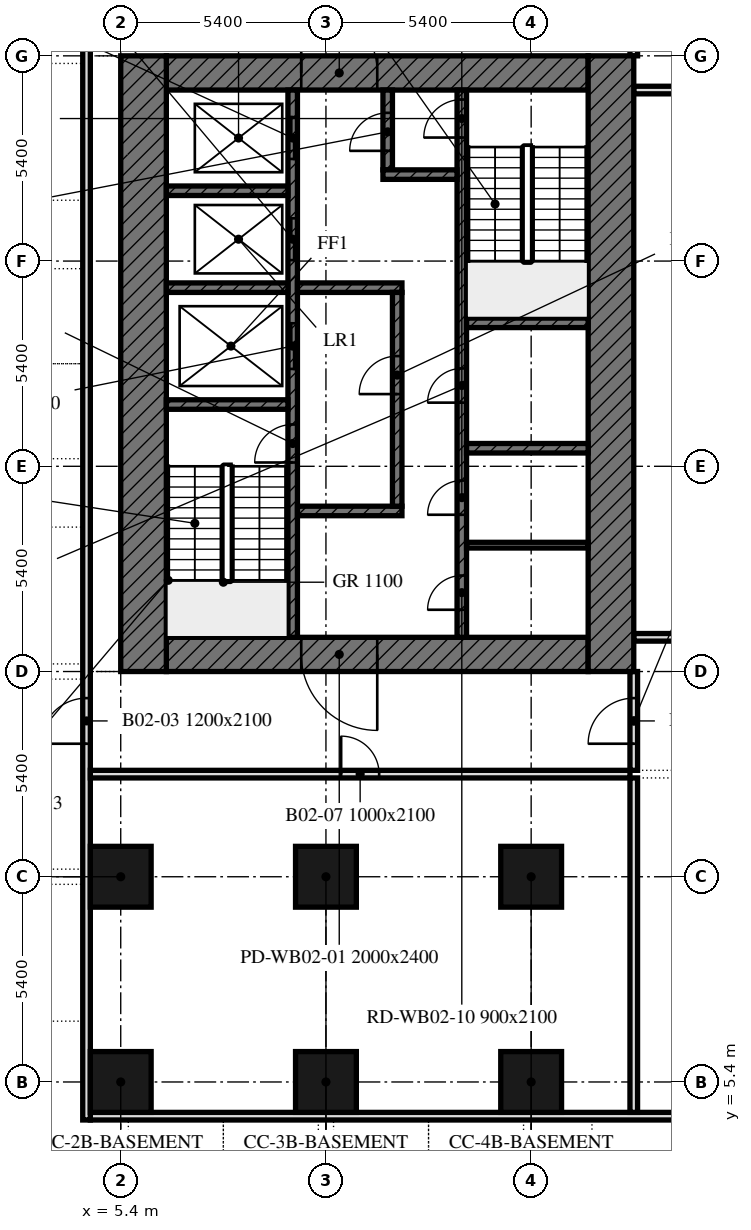
"""IFC4 building model, lengths in metres.
Left out: names, types, materials, properties, quantities, classifications, styles, units other than length and angle.
Written with IfcOpenShell. Run it as: python <this file> out.ifc"""

import sys

from ifc_helpers import new_model, si_unit, direction, frame, frame_2d, origin, origin_2d, place, context, subcontext, project, spatial, rectangle, extrude, element, fill, save


model = new_model("IFC4")
c1 = context("Model", 3, precision=1e-05, world=origin(), true_north=direction((0.0, 1.0)))
c2 = subcontext(c1, "Body", "Model", "MODEL_VIEW")
j1 = project(units=[si_unit("LENGTHUNIT", "METRE"), si_unit("PLANEANGLEUNIT", "RADIAN")], contexts=[c1])
p1 = place(None, origin())
s1 = spatial("IfcSite", under=j1, at=p1, CompositionType="ELEMENT")
p2 = place(p1, origin())
s2 = spatial("IfcBuilding", under=s1, at=p2, CompositionType="ELEMENT")
p3 = place(p2, frame((0.0, 0.0, -9.0)))
s3 = spatial("IfcBuildingStorey", under=s2, at=p3, CompositionType="ELEMENT", Elevation=-9.0)
for number, where, z_axis, x_axis in (
    (1, (5.4, 5.4, 0.0), (0.0, 0.0, 1.0), (1.0, 0.0, 0.0)),
    (2, (10.8, 5.4, 0.0), (0.0, 0.0, 1.0), (1.0, 0.0, 0.0)),
    (3, (16.2, 5.4, 0.0), (0.0, 0.0, 1.0), (1.0, 0.0, 0.0)),
    (4, (5.4, 10.8, 0.0), (0.0, 0.0, 1.0), (1.0, 0.0, 0.0)),
    (5, (10.8, 10.8, 0.0), (0.0, 0.0, 1.0), (1.0, 0.0, 0.0)),
    (6, (16.2, 10.8, 0.0), (0.0, 0.0, 1.0), (1.0, 0.0, 0.0)),
):
    element("IfcColumn", number, at=place(p3, frame(where, z_axis=z_axis, x_axis=x_axis)), inside=s3, PredefinedType="COLUMN", context=c2, shape_type="SweptSolid", body=[
        extrude(rectangle(XDim=1.6, YDim=1.6, at=origin_2d()), origin(), (0.0, 0.0, 1.0), 4.1),
    ])
p4 = place(p3, frame((4.6, 4.5, 0.0), z_axis=(0.0, 0.0, 1.0), x_axis=(1.0, 0.0, 0.0)))
e7 = element("IfcWall", 7, at=p4, inside=s3, PredefinedType="PARTITIONING", context=c2, shape_type="SweptSolid", body=[
    extrude(rectangle(XDim=39.4, YDim=0.2, at=frame_2d((19.7, 0.0))), origin(), (0.0, 0.0, 1.0), 4.1),
])
p5 = place(p4, frame((18.3, 0.0, 0.0)))
e8 = element("IfcOpeningElement", 8, at=p5, cuts=e7, PredefinedType="OPENING", context=c2, shape_type="SweptSolid", body=[
    extrude(rectangle(XDim=1.2, YDim=2.1, at=frame_2d((0.6, 1.05))), frame((0.0, 0.11, 0.0), z_axis=(0.0, -1.0, 0.0), x_axis=(1.0, 0.0, 0.0)), (0.0, 0.0, 1.0), 0.22),
])
p6 = place(p3, frame((4.5, 4.4, 0.0), z_axis=(0.0, 0.0, 1.0), x_axis=(0.0, 1.0, 0.0)))
e9 = element("IfcWall", 9, at=p6, inside=s3, PredefinedType="PARTITIONING", context=c2, shape_type="SweptSolid", body=[
    extrude(rectangle(XDim=39.8, YDim=0.2, at=frame_2d((19.9, 0.0))), origin(), (0.0, 0.0, 1.0), 4.1),
])
p7 = place(p6, frame((9.9, 0.0, 0.0)))
e10 = element("IfcOpeningElement", 10, at=p7, cuts=e9, PredefinedType="OPENING", context=c2, shape_type="SweptSolid", body=[
    extrude(rectangle(XDim=1.2, YDim=2.1, at=frame_2d((0.6, 1.05))), frame((0.0, 0.11, 0.0), z_axis=(0.0, -1.0, 0.0), x_axis=(1.0, 0.0, 0.0)), (0.0, 0.0, 1.0), 0.22),
])
p8 = place(p6, frame((28.7, 0.0, 0.0)))
e11 = element("IfcOpeningElement", 11, at=p8, cuts=e9, PredefinedType="OPENING", context=c2, shape_type="SweptSolid", body=[
    extrude(rectangle(XDim=1.2, YDim=2.1, at=frame_2d((0.6, 1.05))), frame((0.0, 0.11, 0.0), z_axis=(0.0, -1.0, 0.0), x_axis=(1.0, 0.0, 0.0)), (0.0, 0.0, 1.0), 0.22),
])
p9 = place(p3, frame((18.9, 4.6, 0.0), z_axis=(0.0, 0.0, 1.0), x_axis=(0.0, 1.0, 0.0)))
e12 = element("IfcWall", 12, at=p9, inside=s3, PredefinedType="PARTITIONING", context=c2, shape_type="SweptSolid", body=[
    extrude(rectangle(XDim=8.8, YDim=0.2, at=frame_2d((4.4, 0.0))), origin(), (0.0, 0.0, 1.0), 4.1),
])
p10 = place(p3, frame((4.6, 13.5, 0.0), z_axis=(0.0, 0.0, 1.0), x_axis=(1.0, 0.0, 0.0)))
e13 = element("IfcWall", 13, at=p10, inside=s3, PredefinedType="PARTITIONING", context=c2, shape_type="SweptSolid", body=[
    extrude(rectangle(XDim=14.2, YDim=0.2, at=frame_2d((7.1, 0.0))), origin(), (0.0, 0.0, 1.0), 4.1),
])
p11 = place(p10, frame((6.6, 0.0, 0.0)))
e14 = element("IfcOpeningElement", 14, at=p11, cuts=e13, PredefinedType="OPENING", context=c2, shape_type="SweptSolid", body=[
    extrude(rectangle(XDim=1.0, YDim=2.1, at=frame_2d((0.5, 1.05))), frame((0.0, 0.11, 0.0), z_axis=(0.0, -1.0, 0.0), x_axis=(1.0, 0.0, 0.0)), (0.0, 0.0, 1.0), 0.22),
])
p12 = place(p3, frame((18.9, 13.6, 0.0), z_axis=(0.0, 0.0, 1.0), x_axis=(0.0, 1.0, 0.0)))
e15 = element("IfcWall", 15, at=p12, inside=s3, PredefinedType="PARTITIONING", context=c2, shape_type="SweptSolid", body=[
    extrude(rectangle(XDim=2.6, YDim=0.2, at=frame_2d((1.3, 0.0))), origin(), (0.0, 0.0, 1.0), 4.1),
])
p13 = place(p12, frame((0.7, 0.0, 0.0)))
e16 = element("IfcOpeningElement", 16, at=p13, cuts=e15, PredefinedType="OPENING", context=c2, shape_type="SweptSolid", body=[
    extrude(rectangle(XDim=1.2, YDim=2.1, at=frame_2d((0.6, 1.05))), frame((0.0, 0.11, 0.0), z_axis=(0.0, -1.0, 0.0), x_axis=(1.0, 0.0, 0.0)), (0.0, 0.0, 1.0), 0.22),
])
p14 = place(p3, frame((18.9, 32.4, 0.0), z_axis=(0.0, 0.0, 1.0), x_axis=(0.0, 1.0, 0.0)))
e17 = element("IfcWall", 17, at=p14, inside=s3, PredefinedType="PARTITIONING", context=c2, shape_type="SweptSolid", body=[
    extrude(rectangle(XDim=2.6, YDim=0.2, at=frame_2d((1.3, 0.0))), origin(), (0.0, 0.0, 1.0), 4.1),
])
p15 = place(p14, frame((0.7, 0.0, 0.0)))
e18 = element("IfcOpeningElement", 18, at=p15, cuts=e17, PredefinedType="OPENING", context=c2, shape_type="SweptSolid", body=[
    extrude(rectangle(XDim=1.2, YDim=2.1, at=frame_2d((0.6, 1.05))), frame((0.0, 0.11, 0.0), z_axis=(0.0, -1.0, 0.0), x_axis=(1.0, 0.0, 0.0)), (0.0, 0.0, 1.0), 0.22),
])
p16 = place(p3, frame((18.9, 17.1, 0.0), z_axis=(0.0, 0.0, 1.0), x_axis=(1.0, 0.0, 0.0)))
e19 = element("IfcWall", 19, at=p16, inside=s3, PredefinedType="PARTITIONING", context=c2, shape_type="SweptSolid", body=[
    extrude(rectangle(XDim=10.8, YDim=0.2, at=frame_2d((5.4, 0.0))), origin(), (0.0, 0.0, 1.0), 4.1),
])
p17 = place(p16, frame((4.9, 0.0, 0.0)))
e20 = element("IfcOpeningElement", 20, at=p17, cuts=e19, PredefinedType="OPENING", context=c2, shape_type="SweptSolid", body=[
    extrude(rectangle(XDim=1.0, YDim=2.1, at=frame_2d((0.5, 1.05))), frame((0.0, 0.11, 0.0), z_axis=(0.0, -1.0, 0.0), x_axis=(1.0, 0.0, 0.0)), (0.0, 0.0, 1.0), 0.22),
])
p18 = place(p3, frame((18.9, 31.5, 0.0), z_axis=(0.0, 0.0, 1.0), x_axis=(1.0, 0.0, 0.0)))
e21 = element("IfcWall", 21, at=p18, inside=s3, PredefinedType="PARTITIONING", context=c2, shape_type="SweptSolid", body=[
    extrude(rectangle(XDim=10.8, YDim=0.2, at=frame_2d((5.4, 0.0))), origin(), (0.0, 0.0, 1.0), 4.1),
])
p19 = place(p3, frame((17.7, 16.65, 0.0), z_axis=(0.0, 0.0, 1.0), x_axis=(-1.0, 0.0, 0.0)))
e22 = element("IfcWall", 22, at=p19, inside=s3, PredefinedType="SOLIDWALL", context=c2, shape_type="SweptSolid", body=[
    extrude(rectangle(XDim=11.1, YDim=0.9, at=frame_2d((5.55, 0.0))), origin(), (0.0, 0.0, 1.0), 4.1),
])
p20 = place(p19, frame((5.55, 0.0, 0.0)))
e23 = element("IfcOpeningElement", 23, at=p20, cuts=e22, PredefinedType="OPENING", context=c2, shape_type="SweptSolid", body=[
    extrude(rectangle(XDim=2.0, YDim=2.4, at=frame_2d((1.0, 1.2))), frame((0.0, 0.45, 0.0), z_axis=(0.0, -1.0, 0.0), x_axis=(1.0, 0.0, 0.0)), (0.0, 0.0, 1.0), 0.9),
])
p21 = place(p3, frame((6.6, 31.95, 0.0), z_axis=(0.0, 0.0, 1.0), x_axis=(1.0, 0.0, 0.0)))
e24 = element("IfcWall", 24, at=p21, inside=s3, PredefinedType="SOLIDWALL", context=c2, shape_type="SweptSolid", body=[
    extrude(rectangle(XDim=11.1, YDim=0.9, at=frame_2d((5.55, 0.0))), origin(), (0.0, 0.0, 1.0), 4.1),
])
p22 = place(p21, frame((3.55, 0.0, 0.0)))
e25 = element("IfcOpeningElement", 25, at=p22, cuts=e24, PredefinedType="OPENING", context=c2, shape_type="SweptSolid", body=[
    extrude(rectangle(XDim=2.0, YDim=2.4, at=frame_2d((1.0, 1.2))), frame((0.0, 0.45, 0.0), z_axis=(0.0, -1.0, 0.0), x_axis=(1.0, 0.0, 0.0)), (0.0, 0.0, 1.0), 0.9),
])
for number, where, z_axis, x_axis in (
    (26, (6.0, 16.2, 0.0), (0.0, 0.0, 1.0), (0.0, 1.0, 0.0)),
    (27, (18.3, 32.4, 0.0), (0.0, 0.0, 1.0), (0.0, -1.0, 0.0)),
):
    element("IfcWall", number, at=place(p3, frame(where, z_axis=z_axis, x_axis=x_axis)), inside=s3, PredefinedType="SOLIDWALL", context=c2, shape_type="SweptSolid", body=[
        extrude(rectangle(XDim=16.2, YDim=1.2, at=frame_2d((8.1, 0.0))), origin(), (0.0, 0.0, 1.0), 4.1),
    ])
p23 = place(p3, frame((9.925, 17.1, 0.0), z_axis=(0.0, 0.0, 1.0), x_axis=(0.0, 1.0, 0.0)))
e28 = element("IfcWall", 28, at=p23, inside=s3, PredefinedType="SOLIDWALL", context=c2, shape_type="SweptSolid", body=[
    extrude(rectangle(XDim=14.4, YDim=0.25, at=frame_2d((7.2, 0.0))), origin(), (0.0, 0.0, 1.0), 4.1),
])
p24 = place(p23, frame((4.6, 0.0, 0.0)))
e29 = element("IfcOpeningElement", 29, at=p24, cuts=e28, PredefinedType="OPENING", context=c2, shape_type="SweptSolid", body=[
    extrude(rectangle(XDim=1.0, YDim=2.1, at=frame_2d((0.5, 1.05))), frame((0.0, 0.125, 0.0), z_axis=(0.0, -1.0, 0.0), x_axis=(1.0, 0.0, 0.0)), (0.0, 0.0, 1.0), 0.25),
])
p25 = place(p23, frame((7.062, 0.0, 0.0)))
e30 = element("IfcOpeningElement", 30, at=p25, cuts=e28, PredefinedType="OPENING", context=c2, shape_type="SweptSolid", body=[
    extrude(rectangle(XDim=1.2, YDim=2.1, at=frame_2d((0.6, 1.05))), frame((0.0, 0.125, 0.0), z_axis=(0.0, -1.0, 0.0), x_axis=(1.0, 0.0, 0.0)), (0.0, 0.0, 1.0), 0.25),
])
p26 = place(p23, frame((9.925, 0.0, 0.0)))
e31 = element("IfcOpeningElement", 31, at=p26, cuts=e28, PredefinedType="OPENING", context=c2, shape_type="SweptSolid", body=[
    extrude(rectangle(XDim=1.1, YDim=2.1, at=frame_2d((0.55, 1.05))), frame((0.0, 0.125, 0.0), z_axis=(0.0, -1.0, 0.0), x_axis=(1.0, 0.0, 0.0)), (0.0, 0.0, 1.0), 0.25),
])
p27 = place(p23, frame((12.587, 0.0, 0.0)))
e32 = element("IfcOpeningElement", 32, at=p27, cuts=e28, PredefinedType="OPENING", context=c2, shape_type="SweptSolid", body=[
    extrude(rectangle(XDim=1.1, YDim=2.1, at=frame_2d((0.55, 1.05))), frame((0.0, 0.125, 0.0), z_axis=(0.0, -1.0, 0.0), x_axis=(1.0, 0.0, 0.0)), (0.0, 0.0, 1.0), 0.25),
])
p28 = place(p3, frame((14.375, 17.1, 0.0), z_axis=(0.0, 0.0, 1.0), x_axis=(0.0, 1.0, 0.0)))
e33 = element("IfcWall", 33, at=p28, inside=s3, PredefinedType="SOLIDWALL", context=c2, shape_type="SweptSolid", body=[
    extrude(rectangle(XDim=14.4, YDim=0.25, at=frame_2d((7.2, 0.0))), origin(), (0.0, 0.0, 1.0), 4.1),
])
p29 = place(p28, frame((13.15, 0.0, 0.0)))
e34 = element("IfcOpeningElement", 34, at=p29, cuts=e33, PredefinedType="OPENING", context=c2, shape_type="SweptSolid", body=[
    extrude(rectangle(XDim=1.0, YDim=2.1, at=frame_2d((0.5, 1.05))), frame((0.0, 0.125, 0.0), z_axis=(0.0, -1.0, 0.0), x_axis=(1.0, 0.0, 0.0)), (0.0, 0.0, 1.0), 0.25),
])
p30 = place(p28, frame((0.725, 0.0, 0.0)))
e35 = element("IfcOpeningElement", 35, at=p30, cuts=e33, PredefinedType="OPENING", context=c2, shape_type="SweptSolid", body=[
    extrude(rectangle(XDim=0.9, YDim=2.1, at=frame_2d((0.45, 1.05))), frame((0.0, 0.125, 0.0), z_axis=(0.0, -1.0, 0.0), x_axis=(1.0, 0.0, 0.0)), (0.0, 0.0, 1.0), 0.25),
])
p31 = place(p28, frame((3.225, 0.0, 0.0)))
e36 = element("IfcOpeningElement", 36, at=p31, cuts=e33, PredefinedType="OPENING", context=c2, shape_type="SweptSolid", body=[
    extrude(rectangle(XDim=0.9, YDim=2.1, at=frame_2d((0.45, 1.05))), frame((0.0, 0.125, 0.0), z_axis=(0.0, -1.0, 0.0), x_axis=(1.0, 0.0, 0.0)), (0.0, 0.0, 1.0), 0.25),
])
p32 = place(p28, frame((6.175, 0.0, 0.0)))
e37 = element("IfcOpeningElement", 37, at=p32, cuts=e33, PredefinedType="OPENING", context=c2, shape_type="SweptSolid", body=[
    extrude(rectangle(XDim=0.9, YDim=2.1, at=frame_2d((0.45, 1.05))), frame((0.0, 0.125, 0.0), z_axis=(0.0, -1.0, 0.0), x_axis=(1.0, 0.0, 0.0)), (0.0, 0.0, 1.0), 0.25),
])
for number, where, z_axis, x_axis in (
    (38, (6.6, 23.225, 0.0), (0.0, 0.0, 1.0), (1.0, 0.0, 0.0)),
    (39, (14.5, 25.375, 0.0), (0.0, 0.0, 1.0), (1.0, 0.0, 0.0)),
    (40, (14.5, 22.075, 0.0), (0.0, 0.0, 1.0), (1.0, 0.0, 0.0)),
    (41, (6.6, 26.3, 0.0), (0.0, 0.0, 1.0), (1.0, 0.0, 0.0)),
):
    element("IfcWall", number, at=place(p3, frame(where, z_axis=z_axis, x_axis=x_axis)), inside=s3, PredefinedType="SOLIDWALL", context=c2, shape_type="SweptSolid", body=[
        extrude(rectangle(XDim=3.2, YDim=0.25, at=frame_2d((1.6, 0.0))), origin(), (0.0, 0.0, 1.0), 4.1),
    ])
for number, where, z_axis, x_axis in (
    (42, (10.05, 26.3, 0.0), (0.0, 0.0, 1.0), (1.0, 0.0, 0.0)),
    (43, (10.05, 20.425, 0.0), (0.0, 0.0, 1.0), (1.0, 0.0, 0.0)),
):
    element("IfcWall", number, at=place(p3, frame(where, z_axis=z_axis, x_axis=x_axis)), inside=s3, PredefinedType="SOLIDWALL", context=c2, shape_type="SweptSolid", body=[
        extrude(rectangle(XDim=2.75, YDim=0.25, at=frame_2d((1.375, 0.0))), origin(), (0.0, 0.0, 1.0), 4.1),
    ])
p33 = place(p3, frame((12.425, 29.4, 0.0), z_axis=(0.0, 0.0, 1.0), x_axis=(0.0, 1.0, 0.0)))
e44 = element("IfcWall", 44, at=p33, inside=s3, PredefinedType="SOLIDWALL", context=c2, shape_type="SweptSolid", body=[
    extrude(rectangle(XDim=2.1, YDim=0.25, at=frame_2d((1.05, 0.0))), origin(), (0.0, 0.0, 1.0), 4.1),
])
p34 = place(p33, frame((0.5, 0.0, 0.0)))
e45 = element("IfcOpeningElement", 45, at=p34, cuts=e44, PredefinedType="OPENING", context=c2, shape_type="SweptSolid", body=[
    extrude(rectangle(XDim=1.0, YDim=2.1, at=frame_2d((0.5, 1.05))), frame((0.0, 0.125, 0.0), z_axis=(0.0, -1.0, 0.0), x_axis=(1.0, 0.0, 0.0)), (0.0, 0.0, 1.0), 0.25),
])
p35 = place(p3, frame((12.3, 29.275, 0.0), z_axis=(0.0, 0.0, 1.0), x_axis=(1.0, 0.0, 0.0)))
e46 = element("IfcWall", 46, at=p35, inside=s3, PredefinedType="SOLIDWALL", context=c2, shape_type="SweptSolid", body=[
    extrude(rectangle(XDim=1.95, YDim=0.25, at=frame_2d((0.975, 0.0))), origin(), (0.0, 0.0, 1.0), 4.1),
])
p36 = place(p3, frame((12.675, 20.55, 0.0), z_axis=(0.0, 0.0, 1.0), x_axis=(0.0, 1.0, 0.0)))
e47 = element("IfcWall", 47, at=p36, inside=s3, PredefinedType="SOLIDWALL", context=c2, shape_type="SweptSolid", body=[
    extrude(rectangle(XDim=5.625, YDim=0.25, at=frame_2d((2.812, 0.0))), origin(), (0.0, 0.0, 1.0), 4.1),
])
p37 = place(p36, frame((2.95, 0.0, 0.0)))
e48 = element("IfcOpeningElement", 48, at=p37, cuts=e47, PredefinedType="OPENING", context=c2, shape_type="SweptSolid", body=[
    extrude(rectangle(XDim=1.0, YDim=2.1, at=frame_2d((0.5, 1.05))), frame((0.0, 0.125, 0.0), z_axis=(0.0, -1.0, 0.0), x_axis=(1.0, 0.0, 0.0)), (0.0, 0.0, 1.0), 0.25),
])
p38 = place(p3, frame((6.6, 28.85, 0.0), z_axis=(0.0, 0.0, 1.0), x_axis=(1.0, 0.0, 0.0)))
e49 = element("IfcWall", 49, at=p38, inside=s3, PredefinedType="SOLIDWALL", context=c2, shape_type="SweptSolid", body=[
    extrude(rectangle(XDim=3.2, YDim=0.25, at=frame_2d((1.6, 0.0))), origin(), (0.0, 0.0, 1.0), 4.1),
])
p39 = place(p3, frame((14.5, 19.525, 0.0), z_axis=(0.0, 0.0, 1.0), x_axis=(1.0, 0.0, 0.0)))
e50 = element("IfcWall", 50, at=p39, inside=s3, PredefinedType="PARTITIONING", context=c2, shape_type="SweptSolid", body=[
    extrude(rectangle(XDim=3.2, YDim=0.15, at=frame_2d((1.6, 0.0))), origin(), (0.0, 0.0, 1.0), 4.1),
])
p40 = place(p7, origin())
e51 = element("IfcDoor", 51, at=p40, inside=s3, OperationType="SINGLE_SWING_LEFT", PredefinedType="DOOR", context=c2, shape_type="SweptSolid", body=[
    extrude(rectangle(XDim=1.2, YDim=2.1, at=frame_2d((0.6, 1.05))), frame((0.0, 0.025, 0.0), z_axis=(0.0, -1.0, 0.0), x_axis=(1.0, 0.0, 0.0)), (0.0, 0.0, 1.0), 0.05),
])
fill(e10, e51)
p41 = place(p11, origin())
e52 = element("IfcDoor", 52, at=p41, inside=s3, OperationType="SINGLE_SWING_LEFT", PredefinedType="DOOR", context=c2, shape_type="SweptSolid", body=[
    extrude(rectangle(XDim=1.0, YDim=2.1, at=frame_2d((0.5, 1.05))), frame((0.0, 0.025, 0.0), z_axis=(0.0, -1.0, 0.0), x_axis=(1.0, 0.0, 0.0)), (0.0, 0.0, 1.0), 0.05),
])
fill(e14, e52)
p42 = place(p13, origin())
e53 = element("IfcDoor", 53, at=p42, inside=s3, OperationType="SINGLE_SWING_LEFT", PredefinedType="DOOR", context=c2, shape_type="SweptSolid", body=[
    extrude(rectangle(XDim=1.2, YDim=2.1, at=frame_2d((0.6, 1.05))), frame((0.0, 0.025, 0.0), z_axis=(0.0, -1.0, 0.0), x_axis=(1.0, 0.0, 0.0)), (0.0, 0.0, 1.0), 0.05),
])
fill(e16, e53)
p43 = place(p20, origin())
e54 = element("IfcDoor", 54, at=p43, inside=s3, OperationType="DOUBLE_DOOR_SINGLE_SWING", PredefinedType="DOOR", context=c2, shape_type="SweptSolid", body=[
    extrude(rectangle(XDim=2.0, YDim=2.4, at=frame_2d((1.0, 1.2))), frame((0.0, 0.025, 0.0), z_axis=(0.0, -1.0, 0.0), x_axis=(1.0, 0.0, 0.0)), (0.0, 0.0, 1.0), 0.05),
])
fill(e23, e54)
p44 = place(p22, origin())
e55 = element("IfcDoor", 55, at=p44, inside=s3, OperationType="DOUBLE_DOOR_SINGLE_SWING", PredefinedType="DOOR", context=c2, shape_type="SweptSolid", body=[
    extrude(rectangle(XDim=2.0, YDim=2.4, at=frame_2d((1.0, 1.2))), frame((0.0, 0.025, 0.0), z_axis=(0.0, -1.0, 0.0), x_axis=(1.0, 0.0, 0.0)), (0.0, 0.0, 1.0), 0.05),
])
fill(e25, e55)
p45 = place(p24, origin())
e56 = element("IfcDoor", 56, at=p45, inside=s3, OperationType="SINGLE_SWING_LEFT", PredefinedType="DOOR", context=c2, shape_type="SweptSolid", body=[
    extrude(rectangle(XDim=1.0, YDim=2.1, at=frame_2d((0.5, 1.05))), frame((0.0, 0.025, 0.0), z_axis=(0.0, -1.0, 0.0), x_axis=(1.0, 0.0, 0.0)), (0.0, 0.0, 1.0), 0.05),
])
fill(e29, e56)
p46 = place(p37, origin())
e57 = element("IfcDoor", 57, at=p46, inside=s3, OperationType="SINGLE_SWING_LEFT", PredefinedType="DOOR", context=c2, shape_type="SweptSolid", body=[
    extrude(rectangle(XDim=1.0, YDim=2.1, at=frame_2d((0.5, 1.05))), frame((0.0, 0.025, 0.0), z_axis=(0.0, -1.0, 0.0), x_axis=(1.0, 0.0, 0.0)), (0.0, 0.0, 1.0), 0.05),
])
fill(e48, e57)
p47 = place(p29, origin())
e58 = element("IfcDoor", 58, at=p47, inside=s3, OperationType="SINGLE_SWING_LEFT", PredefinedType="DOOR", context=c2, shape_type="SweptSolid", body=[
    extrude(rectangle(XDim=1.0, YDim=2.1, at=frame_2d((0.5, 1.05))), frame((0.0, 0.025, 0.0), z_axis=(0.0, -1.0, 0.0), x_axis=(1.0, 0.0, 0.0)), (0.0, 0.0, 1.0), 0.05),
])
fill(e34, e58)
p48 = place(p34, origin())
e59 = element("IfcDoor", 59, at=p48, inside=s3, OperationType="SINGLE_SWING_LEFT", PredefinedType="DOOR", context=c2, shape_type="SweptSolid", body=[
    extrude(rectangle(XDim=1.0, YDim=2.1, at=frame_2d((0.5, 1.05))), frame((0.0, 0.025, 0.0), z_axis=(0.0, -1.0, 0.0), x_axis=(1.0, 0.0, 0.0)), (0.0, 0.0, 1.0), 0.05),
])
fill(e45, e59)
p49 = place(p25, origin())
e60 = element("IfcDoor", 60, at=p49, inside=s3, OperationType="DOUBLE_DOOR_SLIDING", PredefinedType="DOOR", context=c2, shape_type="SweptSolid", body=[
    extrude(rectangle(XDim=1.2, YDim=2.1, at=frame_2d((0.6, 1.05))), frame((0.0, 0.025, 0.0), z_axis=(0.0, -1.0, 0.0), x_axis=(1.0, 0.0, 0.0)), (0.0, 0.0, 1.0), 0.05),
])
fill(e30, e60)
p50 = place(p26, origin())
e61 = element("IfcDoor", 61, at=p50, inside=s3, OperationType="DOUBLE_DOOR_SLIDING", PredefinedType="DOOR", context=c2, shape_type="SweptSolid", body=[
    extrude(rectangle(XDim=1.1, YDim=2.1, at=frame_2d((0.55, 1.05))), frame((0.0, 0.025, 0.0), z_axis=(0.0, -1.0, 0.0), x_axis=(1.0, 0.0, 0.0)), (0.0, 0.0, 1.0), 0.05),
])
fill(e31, e61)
p51 = place(p27, origin())
e62 = element("IfcDoor", 62, at=p51, inside=s3, OperationType="DOUBLE_DOOR_SLIDING", PredefinedType="DOOR", context=c2, shape_type="SweptSolid", body=[
    extrude(rectangle(XDim=1.1, YDim=2.1, at=frame_2d((0.55, 1.05))), frame((0.0, 0.025, 0.0), z_axis=(0.0, -1.0, 0.0), x_axis=(1.0, 0.0, 0.0)), (0.0, 0.0, 1.0), 0.05),
])
fill(e32, e62)
p52 = place(p30, origin())
e63 = element("IfcDoor", 63, at=p52, inside=s3, OperationType="SINGLE_SWING_LEFT", PredefinedType="DOOR", context=c2, shape_type="SweptSolid", body=[
    extrude(rectangle(XDim=0.9, YDim=2.1, at=frame_2d((0.45, 1.05))), frame((0.0, 0.025, 0.0), z_axis=(0.0, -1.0, 0.0), x_axis=(1.0, 0.0, 0.0)), (0.0, 0.0, 1.0), 0.05),
])
fill(e35, e63)
p53 = place(p31, origin())
e64 = element("IfcDoor", 64, at=p53, inside=s3, OperationType="SINGLE_SWING_LEFT", PredefinedType="DOOR", context=c2, shape_type="SweptSolid", body=[
    extrude(rectangle(XDim=0.9, YDim=2.1, at=frame_2d((0.45, 1.05))), frame((0.0, 0.025, 0.0), z_axis=(0.0, -1.0, 0.0), x_axis=(1.0, 0.0, 0.0)), (0.0, 0.0, 1.0), 0.05),
])
fill(e36, e64)
p54 = place(p32, origin())
e65 = element("IfcDoor", 65, at=p54, inside=s3, OperationType="SINGLE_SWING_LEFT", PredefinedType="DOOR", context=c2, shape_type="SweptSolid", body=[
    extrude(rectangle(XDim=0.9, YDim=2.1, at=frame_2d((0.45, 1.05))), frame((0.0, 0.025, 0.0), z_axis=(0.0, -1.0, 0.0), x_axis=(1.0, 0.0, 0.0)), (0.0, 0.0, 1.0), 0.05),
])
fill(e37, e65)
save(model, sys.argv[1])
